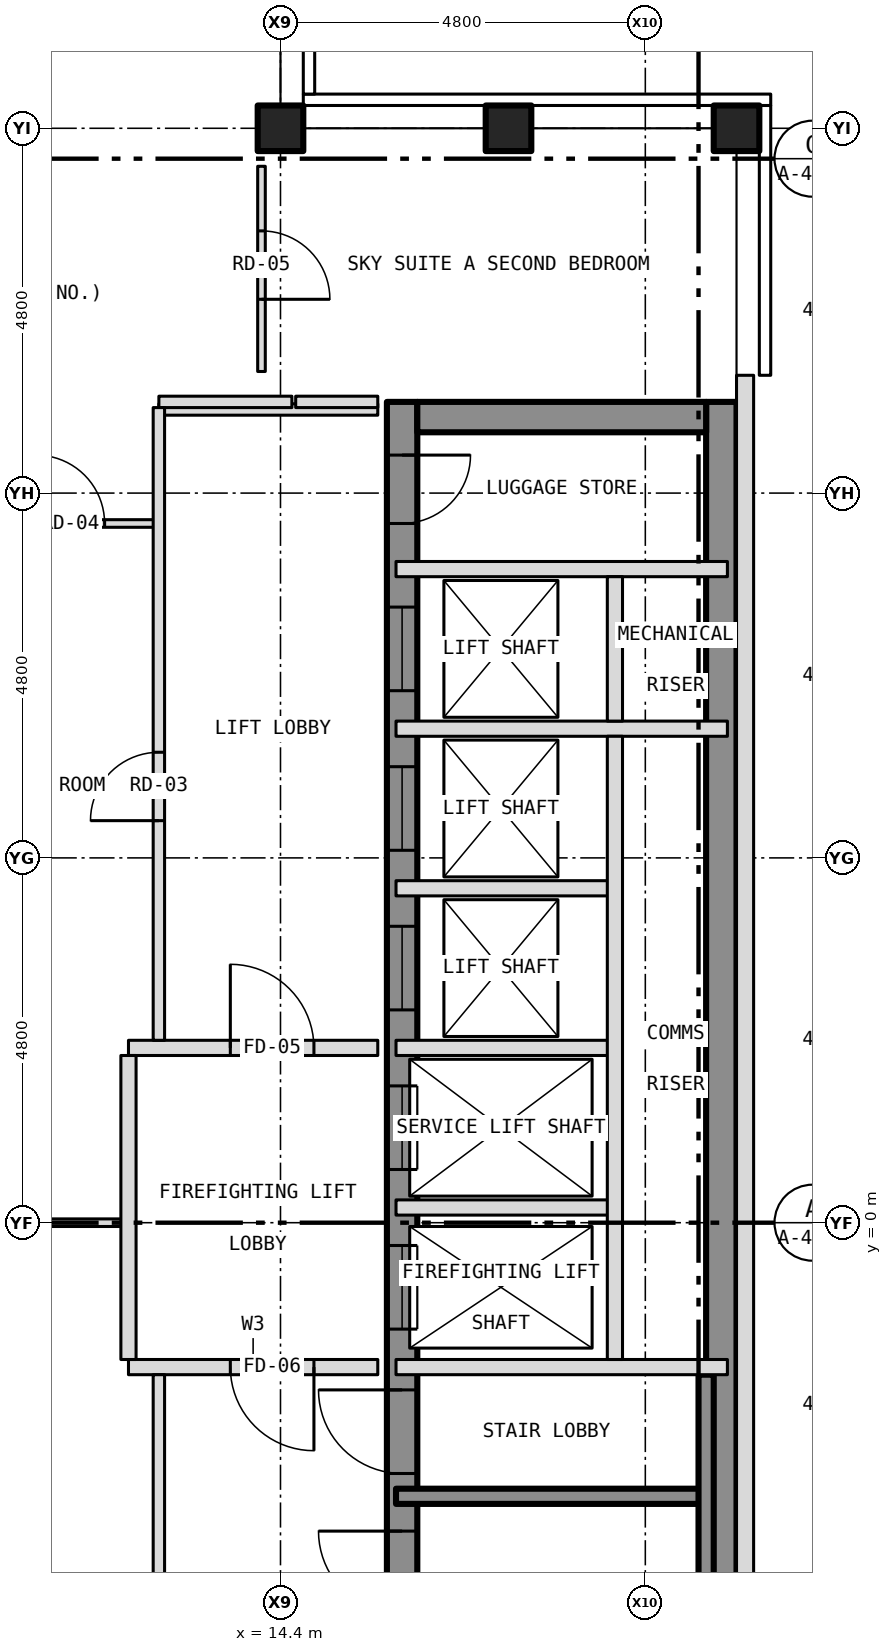
"""IFC4 building model, lengths in metres.
Left out: names, types, materials, properties, quantities, classifications, styles, units other than length and angle.
Written with IfcOpenShell. Run it as: python <this file> out.ifc"""

import sys

from ifc_helpers import new_model, si_unit, direction, frame, frame_2d, origin, origin_2d, place, context, subcontext, project, spatial, rectangle, hollow_rectangle, extrude, element, fill, save


model = new_model("IFC4")
c1 = context("Model", 3, precision=1e-05, world=origin(), true_north=direction((0.0, 1.0)))
c2 = subcontext(c1, "Body", "Model", "MODEL_VIEW")
j1 = project(units=[si_unit("LENGTHUNIT", "METRE"), si_unit("PLANEANGLEUNIT", "RADIAN")], contexts=[c1])
p1 = place(None, origin())
s1 = spatial("IfcSite", under=j1, at=p1, CompositionType="ELEMENT")
p2 = place(p1, origin())
s2 = spatial("IfcBuilding", under=s1, at=p2, CompositionType="ELEMENT")
p3 = place(p2, frame((0.0, 0.0, 269.0)))
s3 = spatial("IfcBuildingStorey", under=s2, at=p3, CompositionType="ELEMENT", Elevation=269.0)
for number, where, z_axis, x_axis in (
    (1, (20.4, 14.4, -0.15), (0.0, 0.0, 1.0), (1.0, 0.0, 0.0)),
    (2, (14.4, 14.4, -0.15), (0.0, 0.0, 1.0), (1.0, 0.0, 0.0)),
    (3, (17.4, 14.4, -0.15), (0.0, 0.0, 1.0), (1.0, 0.0, 0.0)),
):
    element("IfcColumn", number, at=place(p3, frame(where, z_axis=z_axis, x_axis=x_axis)), inside=s3, PredefinedType="COLUMN", context=c2, shape_type="SweptSolid", body=[
        extrude(hollow_rectangle(XDim=0.6, YDim=0.6, WallThickness=0.03, at=origin_2d()), origin(), (0.0, 0.0, 1.0), 3.5),
    ])
p4 = place(p3, frame((16.0, -10.8, 0.0), z_axis=(0.0, 0.0, 1.0), x_axis=(0.0, 1.0, 0.0)))
e4 = element("IfcWall", 4, at=p4, inside=s3, PredefinedType="SHEAR", context=c2, shape_type="SweptSolid", body=[
    extrude(rectangle(XDim=21.6, YDim=0.4, at=frame_2d((10.8, 0.0))), origin(), (0.0, 0.0, 1.0), 3.25),
])
p5 = place(p4, frame((9.4, 0.0, 0.0)))
e5 = element("IfcOpeningElement", 5, at=p5, cuts=e4, PredefinedType="OPENING", context=c2, shape_type="SweptSolid", body=[
    extrude(rectangle(XDim=1.1, YDim=2.1, at=frame_2d((0.55, 1.05))), frame((0.0, 0.212, 0.0), z_axis=(0.0, -1.0, 0.0), x_axis=(1.0, 0.0, 0.0)), (0.0, 0.0, 1.0), 0.424),
])
p6 = place(p4, frame((11.5, 0.0, 0.0)))
e6 = element("IfcOpeningElement", 6, at=p6, cuts=e4, PredefinedType="OPENING", context=c2, shape_type="SweptSolid", body=[
    extrude(rectangle(XDim=1.1, YDim=2.1, at=frame_2d((0.55, 1.05))), frame((0.0, 0.212, 0.0), z_axis=(0.0, -1.0, 0.0), x_axis=(1.0, 0.0, 0.0)), (0.0, 0.0, 1.0), 0.424),
])
p7 = place(p4, frame((13.6, 0.0, 0.0)))
e7 = element("IfcOpeningElement", 7, at=p7, cuts=e4, PredefinedType="OPENING", context=c2, shape_type="SweptSolid", body=[
    extrude(rectangle(XDim=1.1, YDim=2.1, at=frame_2d((0.55, 1.05))), frame((0.0, 0.212, 0.0), z_axis=(0.0, -1.0, 0.0), x_axis=(1.0, 0.0, 0.0)), (0.0, 0.0, 1.0), 0.424),
])
p8 = place(p4, frame((15.7, 0.0, 0.0)))
e8 = element("IfcOpeningElement", 8, at=p8, cuts=e4, PredefinedType="OPENING", context=c2, shape_type="SweptSolid", body=[
    extrude(rectangle(XDim=1.1, YDim=2.1, at=frame_2d((0.55, 1.05))), frame((0.0, 0.212, 0.0), z_axis=(0.0, -1.0, 0.0), x_axis=(1.0, 0.0, 0.0)), (0.0, 0.0, 1.0), 0.424),
])
p9 = place(p4, frame((17.8, 0.0, 0.0)))
e9 = element("IfcOpeningElement", 9, at=p9, cuts=e4, PredefinedType="OPENING", context=c2, shape_type="SweptSolid", body=[
    extrude(rectangle(XDim=1.1, YDim=2.1, at=frame_2d((0.55, 1.05))), frame((0.0, 0.212, 0.0), z_axis=(0.0, -1.0, 0.0), x_axis=(1.0, 0.0, 0.0)), (0.0, 0.0, 1.0), 0.424),
])
p10 = place(p4, frame((5.642, 0.0, 0.0)))
e10 = element("IfcOpeningElement", 10, at=p10, cuts=e4, PredefinedType="OPENING", context=c2, shape_type="SweptSolid", body=[
    extrude(rectangle(XDim=1.1, YDim=2.1, at=frame_2d((0.55, 1.05))), frame((0.0, 0.212, 0.0), z_axis=(0.0, -1.0, 0.0), x_axis=(1.0, 0.0, 0.0)), (0.0, 0.0, 1.0), 0.424),
])
p11 = place(p4, frame((7.5, 0.0, 0.0)))
e11 = element("IfcOpeningElement", 11, at=p11, cuts=e4, PredefinedType="OPENING", context=c2, shape_type="SweptSolid", body=[
    extrude(rectangle(XDim=1.1, YDim=2.1, at=frame_2d((0.55, 1.05))), frame((0.0, 0.212, 0.0), z_axis=(0.0, -1.0, 0.0), x_axis=(1.0, 0.0, 0.0)), (0.0, 0.0, 1.0), 0.424),
])
p12 = place(p4, frame((20.0, 0.0, 0.0)))
e12 = element("IfcOpeningElement", 12, at=p12, cuts=e4, PredefinedType="OPENING", context=c2, shape_type="SweptSolid", body=[
    extrude(rectangle(XDim=0.9, YDim=2.1, at=frame_2d((0.45, 1.05))), frame((0.0, 0.212, 0.0), z_axis=(0.0, -1.0, 0.0), x_axis=(1.0, 0.0, 0.0)), (0.0, 0.0, 1.0), 0.424),
])
p13 = place(p3, frame((20.2, -10.8, 0.0), z_axis=(0.0, 0.0, 1.0), x_axis=(0.0, 1.0, 0.0)))
e13 = element("IfcWall", 13, at=p13, inside=s3, PredefinedType="SHEAR", context=c2, shape_type="SweptSolid", body=[
    extrude(rectangle(XDim=21.6, YDim=0.4, at=frame_2d((10.8, 0.0))), origin(), (0.0, 0.0, 1.0), 3.25),
])
p14 = place(p3, frame((16.2, 10.6, 0.0), z_axis=(0.0, 0.0, 1.0), x_axis=(1.0, 0.0, 0.0)))
e14 = element("IfcWall", 14, at=p14, inside=s3, PredefinedType="SHEAR", context=c2, shape_type="SweptSolid", body=[
    extrude(rectangle(XDim=3.8, YDim=0.4, at=frame_2d((1.9, 0.0))), origin(), (0.0, 0.0, 1.0), 3.25),
])
p15 = place(p3, frame((20.512, -11.15, 0.0), z_axis=(0.0, 0.0, 1.0), x_axis=(0.0, 1.0, 0.0)))
e15 = element("IfcWall", 15, at=p15, inside=s3, PredefinedType="SOLIDWALL", context=c2, shape_type="SweptSolid", body=[
    extrude(rectangle(XDim=22.3, YDim=0.225, at=frame_2d((11.15, 0.0))), origin(), (0.0, 0.0, 1.0), 3.5),
])
p16 = place(p15, frame((3.3, 0.0, 1.0)))
e16 = element("IfcOpeningElement", 16, at=p16, cuts=e15, PredefinedType="OPENING", context=c2, shape_type="SweptSolid", body=[
    extrude(rectangle(XDim=0.6, YDim=1.5, at=frame_2d((0.3, 0.75))), frame((0.0, 0.125, 0.0), z_axis=(0.0, -1.0, 0.0), x_axis=(1.0, 0.0, 0.0)), (0.0, 0.0, 1.0), 0.249),
])
p17 = place(p3, frame((15.92, -3.6, 0.0), z_axis=(0.0, 0.0, 1.0), x_axis=(1.0, 0.0, 0.0)))
e17 = element("IfcWall", 17, at=p17, inside=s3, PredefinedType="SHEAR", context=c2, shape_type="SweptSolid", body=[
    extrude(rectangle(XDim=4.08, YDim=0.2, at=frame_2d((2.04, 0.0))), origin(), (0.0, 0.0, 1.0), 3.25),
])
p18 = place(p3, frame((12.4, -1.9, 0.0), z_axis=(0.0, 0.0, 1.0), x_axis=(1.0, 0.0, 0.0)))
e18 = element("IfcWall", 18, at=p18, inside=s3, PredefinedType="PARTITIONING", context=c2, shape_type="SweptSolid", body=[
    extrude(rectangle(XDim=3.28, YDim=0.2, at=frame_2d((1.64, 0.0))), origin(), (0.0, 0.0, 1.0), 3.35),
])
p19 = place(p18, frame((1.34, 0.0, 0.0)))
e19 = element("IfcOpeningElement", 19, at=p19, cuts=e18, PredefinedType="OPENING", context=c2, shape_type="SweptSolid", body=[
    extrude(rectangle(XDim=1.1, YDim=2.1, at=frame_2d((0.55, 1.05))), frame((0.0, 0.112, 0.0), z_axis=(0.0, -1.0, 0.0), x_axis=(1.0, 0.0, 0.0)), (0.0, 0.0, 1.0), 0.224),
])
p20 = place(p3, frame((15.92, -1.9, 0.0), z_axis=(0.0, 0.0, 1.0), x_axis=(1.0, 0.0, 0.0)))
e20 = element("IfcWall", 20, at=p20, inside=s3, PredefinedType="PARTITIONING", context=c2, shape_type="SweptSolid", body=[
    extrude(rectangle(XDim=4.36, YDim=0.2, at=frame_2d((2.18, 0.0))), origin(), (0.0, 0.0, 1.0), 3.25),
])
p21 = place(p3, frame((9.784, 0.0, 0.0), z_axis=(0.0, 0.0, 1.0), x_axis=(1.0, 0.0, 0.0)))
e21 = element("IfcWall", 21, at=p21, inside=s3, PredefinedType="PARTITIONING", context=c2, shape_type="SweptSolid", body=[
    extrude(rectangle(XDim=2.616, YDim=0.1, at=frame_2d((1.308, 0.0))), origin(), (0.0, 0.0, 1.0), 2.728),
])
p22 = place(p3, frame((15.92, 0.2, 0.0), z_axis=(0.0, 0.0, 1.0), x_axis=(1.0, 0.0, 0.0)))
e22 = element("IfcWall", 22, at=p22, inside=s3, PredefinedType="PARTITIONING", context=c2, shape_type="SweptSolid", body=[
    extrude(rectangle(XDim=2.88, YDim=0.2, at=frame_2d((1.44, 0.0))), origin(), (0.0, 0.0, 1.0), 3.25),
])
p23 = place(p3, frame((12.4, 2.3, 0.0), z_axis=(0.0, 0.0, 1.0), x_axis=(1.0, 0.0, 0.0)))
e23 = element("IfcWall", 23, at=p23, inside=s3, PredefinedType="PARTITIONING", context=c2, shape_type="SweptSolid", body=[
    extrude(rectangle(XDim=3.28, YDim=0.2, at=frame_2d((1.64, 0.0))), origin(), (0.0, 0.0, 1.0), 3.35),
])
p24 = place(p23, frame((1.34, 0.0, 0.0)))
e24 = element("IfcOpeningElement", 24, at=p24, cuts=e23, PredefinedType="OPENING", context=c2, shape_type="SweptSolid", body=[
    extrude(rectangle(XDim=1.1, YDim=2.1, at=frame_2d((0.55, 1.05))), frame((0.0, 0.112, 0.0), z_axis=(0.0, -1.0, 0.0), x_axis=(1.0, 0.0, 0.0)), (0.0, 0.0, 1.0), 0.224),
])
for number, where, z_axis, x_axis in (
    (25, (15.92, 2.3, 0.0), (0.0, 0.0, 1.0), (1.0, 0.0, 0.0)),
    (26, (15.92, 4.4, 0.0), (0.0, 0.0, 1.0), (1.0, 0.0, 0.0)),
):
    element("IfcWall", number, at=place(p3, frame(where, z_axis=z_axis, x_axis=x_axis)), inside=s3, PredefinedType="PARTITIONING", context=c2, shape_type="SweptSolid", body=[
        extrude(rectangle(XDim=2.88, YDim=0.2, at=frame_2d((1.44, 0.0))), origin(), (0.0, 0.0, 1.0), 3.25),
    ])
for number, where, z_axis, x_axis in (
    (27, (15.92, 6.5, 0.0), (0.0, 0.0, 1.0), (1.0, 0.0, 0.0)),
    (28, (15.92, 8.6, 0.0), (0.0, 0.0, 1.0), (1.0, 0.0, 0.0)),
):
    element("IfcWall", number, at=place(p3, frame(where, z_axis=z_axis, x_axis=x_axis)), inside=s3, PredefinedType="PARTITIONING", context=c2, shape_type="SweptSolid", body=[
        extrude(rectangle(XDim=4.36, YDim=0.2, at=frame_2d((2.18, 0.0))), origin(), (0.0, 0.0, 1.0), 3.25),
    ])
p25 = place(p3, frame((7.542, 9.2, 0.0), z_axis=(0.0, 0.0, 1.0), x_axis=(1.0, 0.0, 0.0)))
e29 = element("IfcWall", 29, at=p25, inside=s3, PredefinedType="PARTITIONING", context=c2, shape_type="SweptSolid", body=[
    extrude(rectangle(XDim=5.258, YDim=0.1, at=frame_2d((2.629, 0.0))), origin(), (0.0, 0.0, 1.0), 3.35),
])
p26 = place(p25, frame((3.644, 0.0, 0.0)))
e30 = element("IfcOpeningElement", 30, at=p26, cuts=e29, PredefinedType="OPENING", context=c2, shape_type="SweptSolid", body=[
    extrude(rectangle(XDim=0.9, YDim=2.1, at=frame_2d((0.45, 1.05))), frame((0.0, 0.062, 0.0), z_axis=(0.0, -1.0, 0.0), x_axis=(1.0, 0.0, 0.0)), (0.0, 0.0, 1.0), 0.124),
])
p27 = place(p3, frame((12.8, 10.7, 0.0), z_axis=(0.0, 0.0, 1.0), x_axis=(1.0, 0.0, 0.0)))
e31 = element("IfcWall", 31, at=p27, inside=s3, PredefinedType="PARTITIONING", context=c2, shape_type="SweptSolid", body=[
    extrude(rectangle(XDim=2.88, YDim=0.15, at=frame_2d((1.44, 0.0))), origin(), (0.0, 0.0, 1.0), 3.35),
])
p28 = place(p3, frame((12.8, 10.8, 0.0), z_axis=(0.0, 0.0, 1.0), x_axis=(1.0, 0.0, 0.0)))
e32 = element("IfcWall", 32, at=p28, inside=s3, PredefinedType="PARTITIONING", context=c2, shape_type="SweptSolid", body=[
    extrude(rectangle(XDim=1.75, YDim=0.15, at=frame_2d((0.875, 0.0))), origin(), (0.0, 0.0, 1.0), 3.35),
])
p29 = place(p3, frame((14.6, 10.8, 0.0), z_axis=(0.0, 0.0, 1.0), x_axis=(1.0, 0.0, 0.0)))
e33 = element("IfcWall", 33, at=p29, inside=s3, PredefinedType="PARTITIONING", context=c2, shape_type="SweptSolid", body=[
    extrude(rectangle(XDim=1.08, YDim=0.15, at=frame_2d((0.54, 0.0))), origin(), (0.0, 0.0, 1.0), 3.35),
])
p30 = place(p3, frame((12.4, -1.8, 0.0), z_axis=(0.0, 0.0, 1.0), x_axis=(0.0, 1.0, 0.0)))
e34 = element("IfcWall", 34, at=p30, inside=s3, PredefinedType="PARTITIONING", context=c2, shape_type="SweptSolid", body=[
    extrude(rectangle(XDim=4.0, YDim=0.2, at=frame_2d((2.0, 0.0))), origin(), (0.0, 0.0, 1.0), 3.35),
])
p31 = place(p3, frame((12.8, -10.725, 0.0), z_axis=(0.0, 0.0, 1.0), x_axis=(0.0, 1.0, 0.0)))
e35 = element("IfcWall", 35, at=p31, inside=s3, PredefinedType="PARTITIONING", context=c2, shape_type="SweptSolid", body=[
    extrude(rectangle(XDim=8.725, YDim=0.15, at=frame_2d((4.363, 0.0))), origin(), (0.0, 0.0, 1.0), 3.35),
])
p32 = place(p31, frame((4.225, 0.0, 0.0)))
e36 = element("IfcOpeningElement", 36, at=p32, cuts=e35, PredefinedType="OPENING", context=c2, shape_type="SweptSolid", body=[
    extrude(rectangle(XDim=0.9, YDim=2.1, at=frame_2d((0.45, 1.05))), frame((0.0, 0.087, 0.0), z_axis=(0.0, -1.0, 0.0), x_axis=(1.0, 0.0, 0.0)), (0.0, 0.0, 1.0), 0.174),
])
p33 = place(p3, frame((12.8, 2.4, 0.0), z_axis=(0.0, 0.0, 1.0), x_axis=(0.0, 1.0, 0.0)))
e37 = element("IfcWall", 37, at=p33, inside=s3, PredefinedType="PARTITIONING", context=c2, shape_type="SweptSolid", body=[
    extrude(rectangle(XDim=8.325, YDim=0.15, at=frame_2d((4.163, 0.0))), origin(), (0.0, 0.0, 1.0), 3.35),
])
p34 = place(p33, frame((2.89, 0.0, 0.0)))
e38 = element("IfcOpeningElement", 38, at=p34, cuts=e37, PredefinedType="OPENING", context=c2, shape_type="SweptSolid", body=[
    extrude(rectangle(XDim=0.9, YDim=2.1, at=frame_2d((0.45, 1.05))), frame((0.0, 0.087, 0.0), z_axis=(0.0, -1.0, 0.0), x_axis=(1.0, 0.0, 0.0)), (0.0, 0.0, 1.0), 0.174),
])
p35 = place(p3, frame((14.15, 11.2, 0.0), z_axis=(0.0, 0.0, 1.0), x_axis=(0.0, 1.0, 0.0)))
e39 = element("IfcWall", 39, at=p35, inside=s3, PredefinedType="PARTITIONING", context=c2, shape_type="SweptSolid", body=[
    extrude(rectangle(XDim=2.7, YDim=0.1, at=frame_2d((1.35, 0.0))), origin(), (0.0, 0.0, 1.0), 3.35),
])
p36 = place(p35, frame((0.95, 0.0, 0.0)))
e40 = element("IfcOpeningElement", 40, at=p36, cuts=e39, PredefinedType="OPENING", context=c2, shape_type="SweptSolid", body=[
    extrude(rectangle(XDim=0.9, YDim=2.1, at=frame_2d((0.45, 1.05))), frame((0.0, 0.062, 0.0), z_axis=(0.0, -1.0, 0.0), x_axis=(1.0, 0.0, 0.0)), (0.0, 0.0, 1.0), 0.124),
])
p37 = place(p3, frame((18.8, -1.8, 0.0), z_axis=(0.0, 0.0, 1.0), x_axis=(0.0, 1.0, 0.0)))
e41 = element("IfcWall", 41, at=p37, inside=s3, PredefinedType="PARTITIONING", context=c2, shape_type="SweptSolid", body=[
    extrude(rectangle(XDim=8.2, YDim=0.2, at=frame_2d((4.1, 0.0))), origin(), (0.0, 0.0, 1.0), 3.25),
])
p38 = place(p3, frame((18.8, 6.6, 0.0), z_axis=(0.0, 0.0, 1.0), x_axis=(0.0, 1.0, 0.0)))
e42 = element("IfcWall", 42, at=p38, inside=s3, PredefinedType="PARTITIONING", context=c2, shape_type="SweptSolid", body=[
    extrude(rectangle(XDim=1.9, YDim=0.2, at=frame_2d((0.95, 0.0))), origin(), (0.0, 0.0, 1.0), 3.25),
])
p39 = place(p3, frame((20.0, -10.68, 0.0), z_axis=(0.0, 0.0, 1.0), x_axis=(0.0, 1.0, 0.0)))
e43 = element("IfcWall", 43, at=p39, inside=s3, PredefinedType="SHEAR", context=c2, shape_type="SweptSolid", body=[
    extrude(rectangle(XDim=8.68, YDim=0.2, at=frame_2d((4.34, 0.0))), origin(), (0.0, 0.0, 1.0), 3.25),
])
p40 = place(p5, origin())
e44 = element("IfcDoor", 44, at=p40, inside=s3, OperationType="SLIDING_TO_LEFT", PredefinedType="DOOR", context=c2, shape_type="SweptSolid", body=[
    extrude(rectangle(XDim=1.1, YDim=2.1, at=frame_2d((0.55, 1.05))), frame((0.0, 0.025, 0.0), z_axis=(0.0, -1.0, 0.0), x_axis=(1.0, 0.0, 0.0)), (0.0, 0.0, 1.0), 0.05),
])
fill(e5, e44)
p41 = place(p6, origin())
e45 = element("IfcDoor", 45, at=p41, inside=s3, OperationType="SLIDING_TO_LEFT", PredefinedType="DOOR", context=c2, shape_type="SweptSolid", body=[
    extrude(rectangle(XDim=1.1, YDim=2.1, at=frame_2d((0.55, 1.05))), frame((0.0, 0.025, 0.0), z_axis=(0.0, -1.0, 0.0), x_axis=(1.0, 0.0, 0.0)), (0.0, 0.0, 1.0), 0.05),
])
fill(e6, e45)
p42 = place(p7, origin())
e46 = element("IfcDoor", 46, at=p42, inside=s3, OperationType="SLIDING_TO_LEFT", PredefinedType="DOOR", context=c2, shape_type="SweptSolid", body=[
    extrude(rectangle(XDim=1.1, YDim=2.1, at=frame_2d((0.55, 1.05))), frame((0.0, 0.025, 0.0), z_axis=(0.0, -1.0, 0.0), x_axis=(1.0, 0.0, 0.0)), (0.0, 0.0, 1.0), 0.05),
])
fill(e7, e46)
p43 = place(p8, origin())
e47 = element("IfcDoor", 47, at=p43, inside=s3, OperationType="SLIDING_TO_LEFT", PredefinedType="DOOR", context=c2, shape_type="SweptSolid", body=[
    extrude(rectangle(XDim=1.1, YDim=2.1, at=frame_2d((0.55, 1.05))), frame((0.0, 0.025, 0.0), z_axis=(0.0, -1.0, 0.0), x_axis=(1.0, 0.0, 0.0)), (0.0, 0.0, 1.0), 0.05),
])
fill(e8, e47)
p44 = place(p9, origin())
e48 = element("IfcDoor", 48, at=p44, inside=s3, OperationType="SLIDING_TO_LEFT", PredefinedType="DOOR", context=c2, shape_type="SweptSolid", body=[
    extrude(rectangle(XDim=1.1, YDim=2.1, at=frame_2d((0.55, 1.05))), frame((0.0, 0.025, 0.0), z_axis=(0.0, -1.0, 0.0), x_axis=(1.0, 0.0, 0.0)), (0.0, 0.0, 1.0), 0.05),
])
fill(e9, e48)
p45 = place(p10, origin())
e49 = element("IfcDoor", 49, at=p45, inside=s3, OperationType="SINGLE_SWING_RIGHT", PredefinedType="DOOR", context=c2, shape_type="SweptSolid", body=[
    extrude(rectangle(XDim=1.1, YDim=2.1, at=frame_2d((0.55, 1.05))), frame((0.0, 0.025, 0.0), z_axis=(0.0, -1.0, 0.0), x_axis=(1.0, 0.0, 0.0)), (0.0, 0.0, 1.0), 0.05),
])
fill(e10, e49)
p46 = place(p11, origin())
e50 = element("IfcDoor", 50, at=p46, inside=s3, OperationType="SINGLE_SWING_RIGHT", PredefinedType="DOOR", context=c2, shape_type="SweptSolid", body=[
    extrude(rectangle(XDim=1.1, YDim=2.1, at=frame_2d((0.55, 1.05))), frame((0.0, 0.025, 0.0), z_axis=(0.0, -1.0, 0.0), x_axis=(1.0, 0.0, 0.0)), (0.0, 0.0, 1.0), 0.05),
])
fill(e11, e50)
p47 = place(p12, origin())
e51 = element("IfcDoor", 51, at=p47, inside=s3, OperationType="SINGLE_SWING_RIGHT", PredefinedType="DOOR", context=c2, shape_type="SweptSolid", body=[
    extrude(rectangle(XDim=0.9, YDim=2.1, at=frame_2d((0.45, 1.05))), frame((0.0, 0.025, 0.0), z_axis=(0.0, -1.0, 0.0), x_axis=(1.0, 0.0, 0.0)), (0.0, 0.0, 1.0), 0.05),
])
fill(e12, e51)
p48 = place(p24, origin())
e52 = element("IfcDoor", 52, at=p48, inside=s3, OperationType="SINGLE_SWING_LEFT", PredefinedType="DOOR", context=c2, shape_type="SweptSolid", body=[
    extrude(rectangle(XDim=1.1, YDim=2.1, at=frame_2d((0.55, 1.05))), frame((0.0, 0.025, 0.0), z_axis=(0.0, -1.0, 0.0), x_axis=(1.0, 0.0, 0.0)), (0.0, 0.0, 1.0), 0.05),
])
fill(e24, e52)
p49 = place(p19, origin())
e53 = element("IfcDoor", 53, at=p49, inside=s3, OperationType="SINGLE_SWING_RIGHT", PredefinedType="DOOR", context=c2, shape_type="SweptSolid", body=[
    extrude(rectangle(XDim=1.1, YDim=2.1, at=frame_2d((0.55, 1.05))), frame((0.0, 0.025, 0.0), z_axis=(0.0, -1.0, 0.0), x_axis=(1.0, 0.0, 0.0)), (0.0, 0.0, 1.0), 0.05),
])
fill(e19, e53)
p50 = place(p34, origin())
e54 = element("IfcDoor", 54, at=p50, inside=s3, OperationType="SINGLE_SWING_LEFT", PredefinedType="DOOR", context=c2, shape_type="SweptSolid", body=[
    extrude(rectangle(XDim=0.9, YDim=2.1, at=frame_2d((0.45, 1.05))), frame((0.0, 0.025, 0.0), z_axis=(0.0, -1.0, 0.0), x_axis=(1.0, 0.0, 0.0)), (0.0, 0.0, 1.0), 0.05),
])
fill(e38, e54)
p51 = place(p26, origin())
e55 = element("IfcDoor", 55, at=p51, inside=s3, OperationType="SINGLE_SWING_LEFT", PredefinedType="DOOR", context=c2, shape_type="SweptSolid", body=[
    extrude(rectangle(XDim=0.9, YDim=2.1, at=frame_2d((0.45, 1.05))), frame((0.0, 0.025, 0.0), z_axis=(0.0, -1.0, 0.0), x_axis=(1.0, 0.0, 0.0)), (0.0, 0.0, 1.0), 0.05),
])
fill(e30, e55)
p52 = place(p36, origin())
e56 = element("IfcDoor", 56, at=p52, inside=s3, OperationType="SINGLE_SWING_LEFT", PredefinedType="DOOR", context=c2, shape_type="SweptSolid", body=[
    extrude(rectangle(XDim=0.9, YDim=2.1, at=frame_2d((0.45, 1.05))), frame((0.0, 0.025, 0.0), z_axis=(0.0, -1.0, 0.0), x_axis=(1.0, 0.0, 0.0)), (0.0, 0.0, 1.0), 0.05),
])
fill(e40, e56)
save(model, sys.argv[1])
